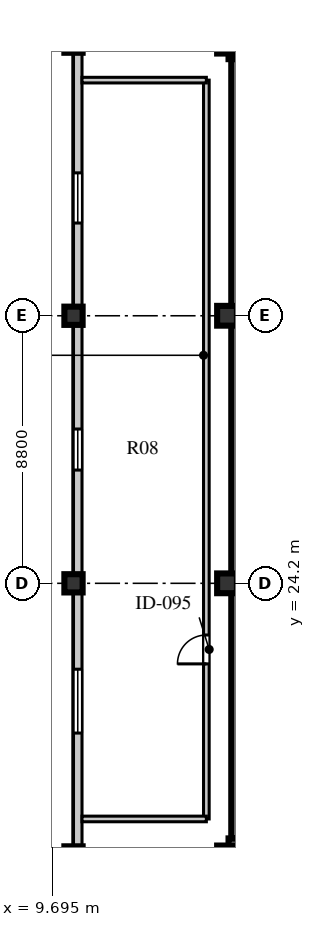
"""IFC4 building model, lengths in metres.
Left out: names, types, materials, properties, quantities, classifications, styles, units other than length and angle.
Written with IfcOpenShell. Run it as: python <this file> out.ifc"""

import sys

from ifc_helpers import new_model, si_unit, direction, frame, frame_2d, origin, origin_2d, place, context, subcontext, project, spatial, rectangle, extrude, element, fill, save


model = new_model("IFC4")
c1 = context("Model", 3, precision=1e-05, world=origin(), true_north=direction((0.0, 1.0)))
c2 = subcontext(c1, "Body", "Model", "MODEL_VIEW")
j1 = project(units=[si_unit("LENGTHUNIT", "METRE"), si_unit("PLANEANGLEUNIT", "RADIAN")], contexts=[c1])
p1 = place(None, origin())
s1 = spatial("IfcSite", under=j1, at=p1, CompositionType="ELEMENT")
p2 = place(p1, origin())
s2 = spatial("IfcBuilding", under=s1, at=p2, CompositionType="ELEMENT")
p3 = place(p2, frame((0.0, 0.0, 335.3)))
s3 = spatial("IfcBuildingStorey", under=s2, at=p3, CompositionType="ELEMENT", Elevation=335.3)
for number, where, z_axis, x_axis in (
    (1, (15.5, 15.61, 0.0), (0.0, 0.0, 1.0), (1.0, 0.0, 0.0)),
    (2, (15.5, 41.64, 0.0), (0.0, 0.0, 1.0), (1.0, 0.0, 0.0)),
):
    element("IfcWall", number, at=place(p3, frame(where, z_axis=z_axis, x_axis=x_axis)), inside=s3, PredefinedType="SHEAR", context=c2, shape_type="SweptSolid", body=[
        extrude(rectangle(XDim=9.48, YDim=0.4, at=frame_2d((4.74, 0.0))), origin(), (0.0, 0.0, 1.0), 3.56),
    ])
p4 = place(p3, frame((15.79, 15.81, 0.0), z_axis=(0.0, 0.0, 1.0), x_axis=(0.0, 1.0, 0.0)))
e3 = element("IfcWall", 3, at=p4, inside=s3, PredefinedType="SHEAR", context=c2, shape_type="SweptSolid", body=[
    extrude(rectangle(XDim=25.63, YDim=0.4, at=frame_2d((12.815, 0.0))), origin(), (0.0, 0.0, 1.0), 3.56),
])
for number, where, z_axis, x_axis in (
    (4, (15.45, 15.25, 0.0), (0.0, 0.0, 1.0), (1.0, 0.0, 0.0)),
    (5, (15.45, 24.2, 0.0), (0.0, 0.0, 1.0), (1.0, 0.0, 0.0)),
    (6, (15.45, 33.0, 0.0), (0.0, 0.0, 1.0), (1.0, 0.0, 0.0)),
    (7, (15.45, 41.95, 0.0), (0.0, 0.0, 1.0), (1.0, 0.0, 0.0)),
):
    element("IfcColumn", number, at=place(p3, frame(where, z_axis=z_axis, x_axis=x_axis)), inside=s3, PredefinedType="COLUMN", context=c2, shape_type="SweptSolid", body=[
        extrude(rectangle(XDim=0.65, YDim=0.65, at=origin_2d()), origin(), (0.0, 0.0, 1.0), 3.56),
    ])
for number, where, z_axis, x_axis in (
    (8, (10.4, 15.25, 0.0), (0.0, 0.0, 1.0), (1.0, 0.0, 0.0)),
    (9, (10.4, 24.2, 0.0), (0.0, 0.0, 1.0), (1.0, 0.0, 0.0)),
    (10, (10.4, 33.0, 0.0), (0.0, 0.0, 1.0), (1.0, 0.0, 0.0)),
    (11, (10.4, 41.95, 0.0), (0.0, 0.0, 1.0), (1.0, 0.0, 0.0)),
):
    element("IfcColumn", number, at=place(p3, frame(where, z_axis=z_axis, x_axis=x_axis)), inside=s3, PredefinedType="COLUMN", context=c2, shape_type="SweptSolid", body=[
        extrude(rectangle(XDim=0.6, YDim=0.6, at=origin_2d()), origin(), (0.0, 0.0, 1.0), 3.56),
    ])
p5 = place(p3, frame((10.54, 42.12, 0.0), z_axis=(0.0, 0.0, 1.0), x_axis=(0.0, -1.0, 0.0)))
e12 = element("IfcWall", 12, at=p5, inside=s3, PredefinedType="STANDARD", context=c2, shape_type="SweptSolid", body=[
    extrude(rectangle(XDim=27.04, YDim=0.28, at=frame_2d((13.52, 0.0))), origin(), (0.0, 0.0, 1.0), 2.92),
])
p6 = place(p5, frame((20.745, 0.0, 0.8)))
e13 = element("IfcOpeningElement", 13, at=p6, cuts=e12, PredefinedType="OPENING", context=c2, shape_type="SweptSolid", body=[
    extrude(rectangle(XDim=2.1, YDim=1.95, at=frame_2d((1.05, 0.975))), frame((0.0, 0.15, 0.0), z_axis=(0.0, -1.0, 0.0), x_axis=(1.0, 0.0, 0.0)), (0.0, 0.0, 1.0), 0.3),
])
p7 = place(p5, frame((12.845, 0.0, 0.8)))
e14 = element("IfcOpeningElement", 14, at=p7, cuts=e12, PredefinedType="OPENING", context=c2, shape_type="SweptSolid", body=[
    extrude(rectangle(XDim=1.35, YDim=1.9, at=frame_2d((0.675, 0.95))), frame((0.0, 0.15, 0.0), z_axis=(0.0, -1.0, 0.0), x_axis=(1.0, 0.0, 0.0)), (0.0, 0.0, 1.0), 0.3),
])
p8 = place(p5, frame((4.42, 0.0, 0.8)))
e15 = element("IfcOpeningElement", 15, at=p8, cuts=e12, PredefinedType="OPENING", context=c2, shape_type="SweptSolid", body=[
    extrude(rectangle(XDim=1.65, YDim=1.95, at=frame_2d((0.825, 0.975))), frame((0.0, 0.15, 0.0), z_axis=(0.0, -1.0, 0.0), x_axis=(1.0, 0.0, 0.0)), (0.0, 0.0, 1.0), 0.3),
])
p9 = place(p3, frame((14.77, 16.45, 0.0), z_axis=(0.0, 0.0, 1.0), x_axis=(0.0, 1.0, 0.0)))
e16 = element("IfcWall", 16, at=p9, inside=s3, PredefinedType="SOLIDWALL", context=c2, shape_type="SweptSolid", body=[
    extrude(rectangle(XDim=24.3, YDim=0.185, at=frame_2d((12.15, 0.0))), origin(), (0.0, 0.0, 1.0), 3.56),
])
p10 = place(p9, frame((5.1, 0.0, 0.0)))
e17 = element("IfcOpeningElement", 17, at=p10, cuts=e16, PredefinedType="OPENING", context=c2, shape_type="SweptSolid", body=[
    extrude(rectangle(XDim=0.95, YDim=2.08, at=frame_2d((0.475, 1.04))), frame((0.0, 0.103, 0.0), z_axis=(0.0, -1.0, 0.0), x_axis=(1.0, 0.0, 0.0)), (0.0, 0.0, 1.0), 0.205),
])
for number, where, z_axis, x_axis in (
    (18, (10.68, 16.45, 0.0), (0.0, 0.0, 1.0), (1.0, 0.0, 0.0)),
    (19, (10.68, 40.75, 0.0), (0.0, 0.0, 1.0), (1.0, 0.0, 0.0)),
):
    element("IfcWall", number, at=place(p3, frame(where, z_axis=z_axis, x_axis=x_axis)), inside=s3, PredefinedType="SOLIDWALL", context=c2, shape_type="SweptSolid", body=[
        extrude(rectangle(XDim=4.09, YDim=0.185, at=frame_2d((2.045, 0.0))), origin(), (0.0, 0.0, 1.0), 3.56),
    ])
p11 = place(p6, origin())
e20 = element("IfcWindow", 20, at=p11, inside=s3, PartitioningType="SINGLE_PANEL", PredefinedType="WINDOW", context=c2, shape_type="SweptSolid", body=[
    extrude(rectangle(XDim=2.1, YDim=1.95, at=frame_2d((1.05, 0.975))), frame((0.0, 0.03, 0.0), z_axis=(0.0, -1.0, 0.0), x_axis=(1.0, 0.0, 0.0)), (0.0, 0.0, 1.0), 0.06),
])
fill(e13, e20)
p12 = place(p7, origin())
e21 = element("IfcWindow", 21, at=p12, inside=s3, PartitioningType="SINGLE_PANEL", PredefinedType="WINDOW", context=c2, shape_type="SweptSolid", body=[
    extrude(rectangle(XDim=1.35, YDim=1.9, at=frame_2d((0.675, 0.95))), frame((0.0, 0.03, 0.0), z_axis=(0.0, -1.0, 0.0), x_axis=(1.0, 0.0, 0.0)), (0.0, 0.0, 1.0), 0.06),
])
fill(e14, e21)
p13 = place(p8, origin())
e22 = element("IfcWindow", 22, at=p13, inside=s3, PartitioningType="SINGLE_PANEL", PredefinedType="WINDOW", context=c2, shape_type="SweptSolid", body=[
    extrude(rectangle(XDim=1.65, YDim=1.95, at=frame_2d((0.825, 0.975))), frame((0.0, 0.03, 0.0), z_axis=(0.0, -1.0, 0.0), x_axis=(1.0, 0.0, 0.0)), (0.0, 0.0, 1.0), 0.06),
])
fill(e15, e22)
p14 = place(p10, origin())
e23 = element("IfcDoor", 23, at=p14, inside=s3, OperationType="SINGLE_SWING_LEFT", PredefinedType="DOOR", context=c2, shape_type="SweptSolid", body=[
    extrude(rectangle(XDim=0.95, YDim=2.08, at=frame_2d((0.475, 1.04))), frame((0.0, 0.025, 0.0), z_axis=(0.0, -1.0, 0.0), x_axis=(1.0, 0.0, 0.0)), (0.0, 0.0, 1.0), 0.05),
])
fill(e17, e23)
save(model, sys.argv[1])
